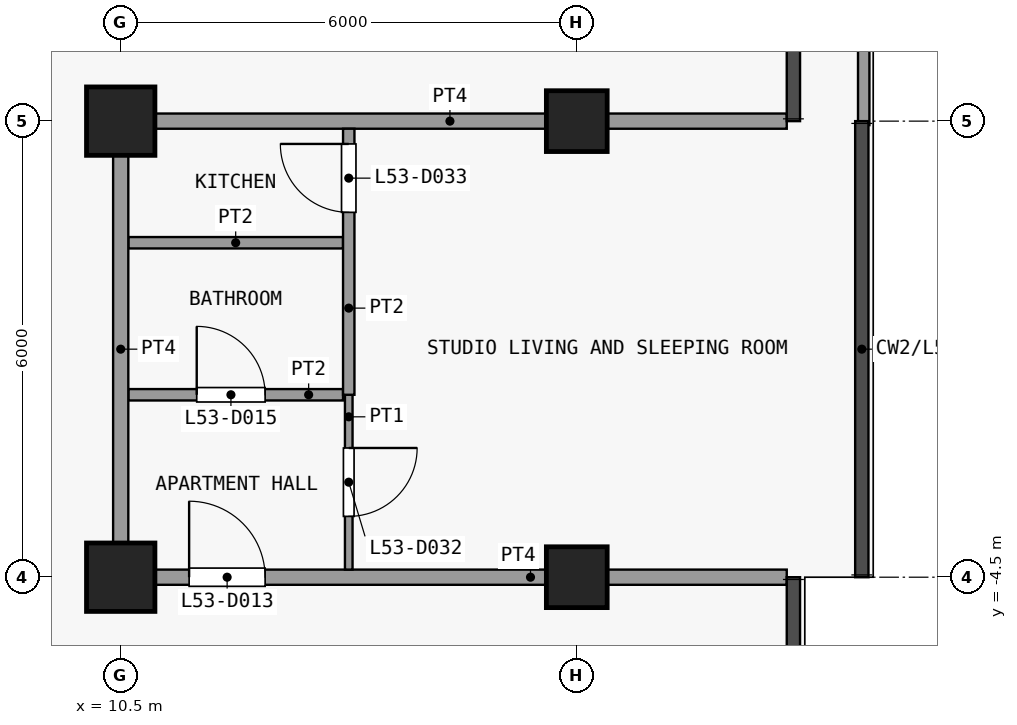
"""IFC4 building model, lengths in metres.
Left out: names, types, materials, properties, quantities, classifications, styles, units other than length and angle.
Written with IfcOpenShell. Run it as: python <this file> out.ifc"""

import sys

from ifc_helpers import new_model, si_unit, direction, frame, frame_2d, origin, origin_2d, place, context, subcontext, project, spatial, rectangle, extrude, element, fill, save


model = new_model("IFC4")
c1 = context("Model", 3, precision=1e-05, world=origin(), true_north=direction((0.0, 1.0)))
c2 = subcontext(c1, "Body", "Model", "MODEL_VIEW")
j1 = project(units=[si_unit("LENGTHUNIT", "METRE"), si_unit("PLANEANGLEUNIT", "RADIAN")], contexts=[c1])
p1 = place(None, origin())
s1 = spatial("IfcSite", under=j1, at=p1, CompositionType="ELEMENT")
p2 = place(p1, origin())
s2 = spatial("IfcBuilding", under=s1, at=p2, CompositionType="ELEMENT")
p3 = place(p2, frame((0.0, 0.0, 212.3)))
s3 = spatial("IfcBuildingStorey", under=s2, at=p3, CompositionType="ELEMENT", Elevation=212.3)
for number, where, z_axis, x_axis in (
    (1, (10.5, -4.5, 0.0), (0.0, 0.0, 1.0), (1.0, 0.0, 0.0)),
    (2, (10.5, 1.5, 0.0), (0.0, 0.0, 1.0), (1.0, 0.0, 0.0)),
):
    element("IfcColumn", number, at=place(p3, frame(where, z_axis=z_axis, x_axis=x_axis)), inside=s3, PredefinedType="COLUMN", context=c2, shape_type="SweptSolid", body=[
        extrude(rectangle(XDim=0.9, YDim=0.9, at=origin_2d()), origin(), (0.0, 0.0, 1.0), 3.6),
    ])
for number, where, z_axis, x_axis in (
    (3, (16.5, -4.5, 0.0), (0.0, 0.0, 1.0), (1.0, 0.0, 0.0)),
    (4, (16.5, 1.5, 0.0), (0.0, 0.0, 1.0), (1.0, 0.0, 0.0)),
):
    element("IfcColumn", number, at=place(p3, frame(where, z_axis=z_axis, x_axis=x_axis)), inside=s3, PredefinedType="COLUMN", context=c2, shape_type="SweptSolid", body=[
        extrude(rectangle(XDim=0.8, YDim=0.8, at=origin_2d()), origin(), (0.0, 0.0, 1.0), 3.6),
    ])
p4 = place(p3, frame((20.275, 7.3, 0.0), z_axis=(0.0, 0.0, 1.0), x_axis=(0.0, -1.0, 0.0)))
e5 = element("IfcWall", 5, at=p4, inside=s3, PredefinedType="PARAPET", context=c2, shape_type="SweptSolid", body=[
    extrude(rectangle(XDim=5.853, YDim=0.15, at=frame_2d((2.926, 0.0))), origin(), (0.0, 0.0, 1.0), 1.15),
])
p5 = place(p3, frame((10.4, -4.5, 0.0), z_axis=(0.0, 0.0, 1.0), x_axis=(1.0, 0.0, 0.0)))
e6 = element("IfcWall", 6, at=p5, inside=s3, PredefinedType="PARTITIONING", context=c2, shape_type="SweptSolid", body=[
    extrude(rectangle(XDim=8.863, YDim=0.2, at=frame_2d((4.431, 0.0))), origin(), (0.0, 0.0, 1.0), 3.3),
])
p6 = place(p5, frame((1.0, 0.0, 0.0)))
e7 = element("IfcOpeningElement", 7, at=p6, cuts=e6, PredefinedType="OPENING", context=c2, shape_type="SweptSolid", body=[
    extrude(rectangle(XDim=1.0, YDim=2.1, at=frame_2d((0.5, 1.05))), frame((0.0, 0.11, 0.0), z_axis=(0.0, -1.0, 0.0), x_axis=(1.0, 0.0, 0.0)), (0.0, 0.0, 1.0), 0.22),
])
p7 = place(p3, frame((10.6, -2.1, 0.0), z_axis=(0.0, 0.0, 1.0), x_axis=(1.0, 0.0, 0.0)))
e8 = element("IfcWall", 8, at=p7, inside=s3, PredefinedType="PARTITIONING", context=c2, shape_type="SweptSolid", body=[
    extrude(rectangle(XDim=2.825, YDim=0.15, at=frame_2d((1.413, 0.0))), origin(), (0.0, 0.0, 1.0), 3.3),
])
p8 = place(p7, frame((0.9, 0.0, 0.0)))
e9 = element("IfcOpeningElement", 9, at=p8, cuts=e8, PredefinedType="OPENING", context=c2, shape_type="SweptSolid", body=[
    extrude(rectangle(XDim=0.9, YDim=2.1, at=frame_2d((0.45, 1.05))), frame((0.0, 0.085, 0.0), z_axis=(0.0, -1.0, 0.0), x_axis=(1.0, 0.0, 0.0)), (0.0, 0.0, 1.0), 0.17),
])
p9 = place(p3, frame((10.6, -0.1, 0.0), z_axis=(0.0, 0.0, 1.0), x_axis=(1.0, 0.0, 0.0)))
e10 = element("IfcWall", 10, at=p9, inside=s3, PredefinedType="PARTITIONING", context=c2, shape_type="SweptSolid", body=[
    extrude(rectangle(XDim=2.825, YDim=0.15, at=frame_2d((1.413, 0.0))), origin(), (0.0, 0.0, 1.0), 3.3),
])
p10 = place(p3, frame((10.4, 1.5, 0.0), z_axis=(0.0, 0.0, 1.0), x_axis=(1.0, 0.0, 0.0)))
e11 = element("IfcWall", 11, at=p10, inside=s3, PredefinedType="PARTITIONING", context=c2, shape_type="SweptSolid", body=[
    extrude(rectangle(XDim=8.863, YDim=0.2, at=frame_2d((4.431, 0.0))), origin(), (0.0, 0.0, 1.0), 3.3),
])
p11 = place(p3, frame((10.5, -4.4, 0.0), z_axis=(0.0, 0.0, 1.0), x_axis=(0.0, 1.0, 0.0)))
e12 = element("IfcWall", 12, at=p11, inside=s3, PredefinedType="PARTITIONING", context=c2, shape_type="SweptSolid", body=[
    extrude(rectangle(XDim=5.8, YDim=0.2, at=frame_2d((2.9, 0.0))), origin(), (0.0, 0.0, 1.0), 3.3),
])
p12 = place(p3, frame((13.5, -4.4, 0.0), z_axis=(0.0, 0.0, 1.0), x_axis=(0.0, 1.0, 0.0)))
e13 = element("IfcWall", 13, at=p12, inside=s3, PredefinedType="PARTITIONING", context=c2, shape_type="SweptSolid", body=[
    extrude(rectangle(XDim=2.3, YDim=0.1, at=frame_2d((1.15, 0.0))), origin(), (0.0, 0.0, 1.0), 3.3),
])
p13 = place(p12, frame((0.7, 0.0, 0.0)))
e14 = element("IfcOpeningElement", 14, at=p13, cuts=e13, PredefinedType="OPENING", context=c2, shape_type="SweptSolid", body=[
    extrude(rectangle(XDim=0.9, YDim=2.1, at=frame_2d((0.45, 1.05))), frame((0.0, 0.06, 0.0), z_axis=(0.0, -1.0, 0.0), x_axis=(1.0, 0.0, 0.0)), (0.0, 0.0, 1.0), 0.12),
])
p14 = place(p3, frame((13.5, -2.1, 0.0), z_axis=(0.0, 0.0, 1.0), x_axis=(0.0, 1.0, 0.0)))
e15 = element("IfcWall", 15, at=p14, inside=s3, PredefinedType="PARTITIONING", context=c2, shape_type="SweptSolid", body=[
    extrude(rectangle(XDim=3.5, YDim=0.15, at=frame_2d((1.75, 0.0))), origin(), (0.0, 0.0, 1.0), 3.3),
])
p15 = place(p14, frame((2.4, 0.0, 0.0)))
e16 = element("IfcOpeningElement", 16, at=p15, cuts=e15, PredefinedType="OPENING", context=c2, shape_type="SweptSolid", body=[
    extrude(rectangle(XDim=0.9, YDim=2.1, at=frame_2d((0.45, 1.05))), frame((0.0, 0.085, 0.0), z_axis=(0.0, -1.0, 0.0), x_axis=(1.0, 0.0, 0.0)), (0.0, 0.0, 1.0), 0.17),
])
p16 = place(p6, origin())
e17 = element("IfcDoor", 17, at=p16, inside=s3, OperationType="SINGLE_SWING_RIGHT", PredefinedType="DOOR", context=c2, shape_type="SweptSolid", body=[
    extrude(rectangle(XDim=1.0, YDim=2.1, at=frame_2d((0.5, 1.05))), frame((0.0, 0.025, 0.0), z_axis=(0.0, -1.0, 0.0), x_axis=(1.0, 0.0, 0.0)), (0.0, 0.0, 1.0), 0.05),
])
fill(e7, e17)
p17 = place(p8, origin())
e18 = element("IfcDoor", 18, at=p17, inside=s3, OperationType="SINGLE_SWING_RIGHT", PredefinedType="DOOR", context=c2, shape_type="SweptSolid", body=[
    extrude(rectangle(XDim=0.9, YDim=2.1, at=frame_2d((0.45, 1.05))), frame((0.0, 0.025, 0.0), z_axis=(0.0, -1.0, 0.0), x_axis=(1.0, 0.0, 0.0)), (0.0, 0.0, 1.0), 0.05),
])
fill(e9, e18)
p18 = place(p13, origin())
e19 = element("IfcDoor", 19, at=p18, inside=s3, OperationType="SINGLE_SWING_RIGHT", PredefinedType="DOOR", context=c2, shape_type="SweptSolid", body=[
    extrude(rectangle(XDim=0.9, YDim=2.1, at=frame_2d((0.45, 1.05))), frame((0.0, 0.025, 0.0), z_axis=(0.0, -1.0, 0.0), x_axis=(1.0, 0.0, 0.0)), (0.0, 0.0, 1.0), 0.05),
])
fill(e14, e19)
p19 = place(p15, origin())
e20 = element("IfcDoor", 20, at=p19, inside=s3, OperationType="SINGLE_SWING_LEFT", PredefinedType="DOOR", context=c2, shape_type="SweptSolid", body=[
    extrude(rectangle(XDim=0.9, YDim=2.1, at=frame_2d((0.45, 1.05))), frame((0.0, 0.025, 0.0), z_axis=(0.0, -1.0, 0.0), x_axis=(1.0, 0.0, 0.0)), (0.0, 0.0, 1.0), 0.05),
])
fill(e16, e20)
save(model, sys.argv[1])
